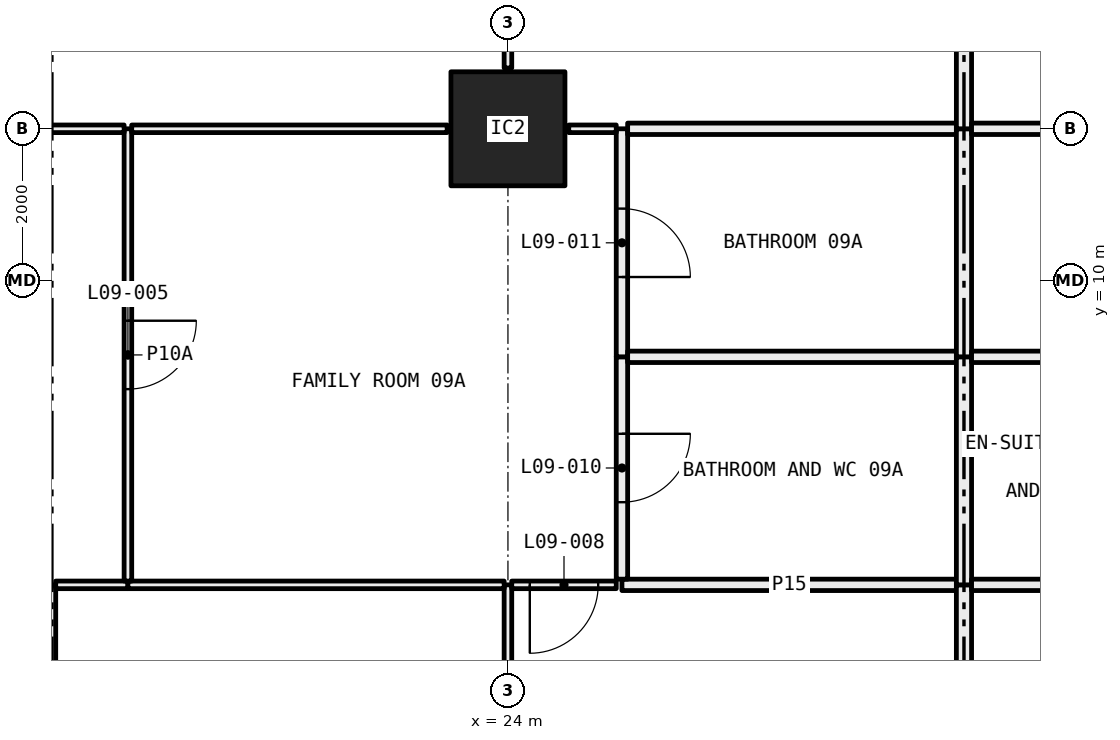
"""IFC4 building model, lengths in metres.
Left out: names, types, materials, properties, quantities, classifications, styles, units other than length and angle.
Written with IfcOpenShell. Run it as: python <this file> out.ifc"""

import sys

from ifc_helpers import new_model, si_unit, direction, frame, frame_2d, origin, origin_2d, place, context, subcontext, project, spatial, rectangle, hollow_rectangle, extrude, element, fill, save


model = new_model("IFC4")
c1 = context("Model", 3, precision=1e-05, world=origin(), true_north=direction((0.0, 1.0)))
c2 = subcontext(c1, "Body", "Model", "MODEL_VIEW")
j1 = project(units=[si_unit("LENGTHUNIT", "METRE"), si_unit("PLANEANGLEUNIT", "RADIAN")], contexts=[c1])
p1 = place(None, origin())
s1 = spatial("IfcSite", under=j1, at=p1, CompositionType="ELEMENT")
p2 = place(p1, origin())
s2 = spatial("IfcBuilding", under=s1, at=p2, CompositionType="ELEMENT")
p3 = place(p2, frame((0.0, 0.0, 43.8)))
s3 = spatial("IfcBuildingStorey", under=s2, at=p3, CompositionType="ELEMENT", Elevation=43.8)
p4 = place(p3, frame((24.0, 12.0, 0.0), z_axis=(0.0, 0.0, 1.0), x_axis=(1.0, 0.0, 0.0)))
e1 = element("IfcColumn", 1, at=p4, inside=s3, PredefinedType="COLUMN", context=c2, shape_type="SweptSolid", body=[
    extrude(hollow_rectangle(XDim=1.5, YDim=1.5, WallThickness=0.065, at=origin_2d()), origin(), (0.0, 0.0, 1.0), 3.05),
])
p5 = place(p3, frame((18.0, 0.72, 0.0), z_axis=(0.0, 0.0, 1.0), x_axis=(0.0, 1.0, 0.0)))
e2 = element("IfcWall", 2, at=p5, inside=s3, PredefinedType="PARTITIONING", context=c2, shape_type="SweptSolid", body=[
    extrude(rectangle(XDim=5.28, YDim=0.1, at=frame_2d((2.64, 0.0))), origin(), (0.0, 0.0, 1.0), 3.05),
])
p6 = place(p5, frame((2.19, 0.0, 0.0)))
e3 = element("IfcOpeningElement", 3, at=p6, cuts=e2, PredefinedType="OPENING", context=c2, shape_type="SweptSolid", body=[
    extrude(rectangle(XDim=0.9, YDim=2.1, at=frame_2d((0.45, 1.05))), frame((0.0, 0.06, 0.0), z_axis=(0.0, -1.0, 0.0), x_axis=(1.0, 0.0, 0.0)), (0.0, 0.0, 1.0), 0.12),
])
p7 = place(p3, frame((24.0, 0.72, 0.0), z_axis=(0.0, 0.0, 1.0), x_axis=(0.0, 1.0, 0.0)))
e4 = element("IfcWall", 4, at=p7, inside=s3, PredefinedType="PARTITIONING", context=c2, shape_type="SweptSolid", body=[
    extrude(rectangle(XDim=5.28, YDim=0.1, at=frame_2d((2.64, 0.0))), origin(), (0.0, 0.0, 1.0), 2.45),
])
p8 = place(p3, frame((19.0, 6.0, 0.0), z_axis=(0.0, 0.0, 1.0), x_axis=(-1.0, 0.0, 0.0)))
e5 = element("IfcWall", 5, at=p8, inside=s3, PredefinedType="PARTITIONING", context=c2, shape_type="SweptSolid", body=[
    extrude(rectangle(XDim=0.95, YDim=0.1, at=frame_2d((0.475, 0.0))), origin(), (0.0, 0.0, 1.0), 3.05),
])
p9 = place(p3, frame((23.95, 6.0, 0.0), z_axis=(0.0, 0.0, 1.0), x_axis=(-1.0, 0.0, 0.0)))
e6 = element("IfcWall", 6, at=p9, inside=s3, PredefinedType="PARTITIONING", context=c2, shape_type="SweptSolid", body=[
    extrude(rectangle(XDim=4.95, YDim=0.1, at=frame_2d((2.475, 0.0))), origin(), (0.0, 0.0, 1.0), 2.45),
])
p10 = place(p3, frame((25.425, 6.0, 0.0), z_axis=(0.0, 0.0, 1.0), x_axis=(-1.0, 0.0, 0.0)))
e7 = element("IfcWall", 7, at=p10, inside=s3, PredefinedType="PARTITIONING", context=c2, shape_type="SweptSolid", body=[
    extrude(rectangle(XDim=1.375, YDim=0.1, at=frame_2d((0.688, 0.0))), origin(), (0.0, 0.0, 1.0), 2.45),
])
p11 = place(p10, frame((0.238, 0.0, 0.0)))
e8 = element("IfcOpeningElement", 8, at=p11, cuts=e7, PredefinedType="OPENING", context=c2, shape_type="SweptSolid", body=[
    extrude(rectangle(XDim=0.9, YDim=2.1, at=frame_2d((0.45, 1.05))), frame((0.0, 0.06, 0.0), z_axis=(0.0, -1.0, 0.0), x_axis=(1.0, 0.0, 0.0)), (0.0, 0.0, 1.0), 0.12),
])
p12 = place(p3, frame((29.9, 6.0, 0.0), z_axis=(0.0, 0.0, 1.0), x_axis=(-1.0, 0.0, 0.0)))
e9 = element("IfcWall", 9, at=p12, inside=s3, PredefinedType="PARTITIONING", context=c2, shape_type="SweptSolid", body=[
    extrude(rectangle(XDim=4.4, YDim=0.15, at=frame_2d((2.2, 0.0))), origin(), (0.0, 0.0, 1.0), 3.05),
])
p13 = place(p3, frame((30.0, 0.72, 0.0), z_axis=(0.0, 0.0, 1.0), x_axis=(0.0, 1.0, 0.0)))
e10 = element("IfcWall", 10, at=p13, inside=s3, PredefinedType="PARTITIONING", context=c2, shape_type="SweptSolid", body=[
    extrude(rectangle(XDim=5.28, YDim=0.2, at=frame_2d((2.64, 0.0))), origin(), (0.0, 0.0, 1.0), 3.05),
])
p14 = place(p3, frame((19.0, 6.05, 0.0), z_axis=(0.0, 0.0, 1.0), x_axis=(0.0, 1.0, 0.0)))
e11 = element("IfcWall", 11, at=p14, inside=s3, PredefinedType="PARTITIONING", context=c2, shape_type="SweptSolid", body=[
    extrude(rectangle(XDim=5.95, YDim=0.1, at=frame_2d((2.975, 0.0))), origin(), (0.0, 0.0, 1.0), 2.45),
])
p15 = place(p14, frame((2.525, 0.0, 0.0)))
e12 = element("IfcOpeningElement", 12, at=p15, cuts=e11, PredefinedType="OPENING", context=c2, shape_type="SweptSolid", body=[
    extrude(rectangle(XDim=0.9, YDim=2.1, at=frame_2d((0.45, 1.05))), frame((0.0, 0.06, 0.0), z_axis=(0.0, -1.0, 0.0), x_axis=(1.0, 0.0, 0.0)), (0.0, 0.0, 1.0), 0.12),
])
p16 = place(p3, frame((18.95, 12.0, 0.0), z_axis=(0.0, 0.0, 1.0), x_axis=(-1.0, 0.0, 0.0)))
e13 = element("IfcWall", 13, at=p16, inside=s3, PredefinedType="PARTITIONING", context=c2, shape_type="SweptSolid", body=[
    extrude(rectangle(XDim=2.45, YDim=0.1, at=frame_2d((1.225, 0.0))), origin(), (0.0, 0.0, 1.0), 2.45),
])
p17 = place(p3, frame((25.5, 6.075, 0.0), z_axis=(0.0, 0.0, 1.0), x_axis=(0.0, 1.0, 0.0)))
e14 = element("IfcWall", 14, at=p17, inside=s3, PredefinedType="PARTITIONING", context=c2, shape_type="SweptSolid", body=[
    extrude(rectangle(XDim=2.925, YDim=0.15, at=frame_2d((1.462, 0.0))), origin(), (0.0, 0.0, 1.0), 3.05),
])
p18 = place(p17, frame((1.012, 0.0, 0.0)))
e15 = element("IfcOpeningElement", 15, at=p18, cuts=e14, PredefinedType="OPENING", context=c2, shape_type="SweptSolid", body=[
    extrude(rectangle(XDim=0.9, YDim=2.1, at=frame_2d((0.45, 1.05))), frame((0.0, 0.085, 0.0), z_axis=(0.0, -1.0, 0.0), x_axis=(1.0, 0.0, 0.0)), (0.0, 0.0, 1.0), 0.17),
])
p19 = place(p3, frame((25.5, 9.0, 0.0), z_axis=(0.0, 0.0, 1.0), x_axis=(0.0, 1.0, 0.0)))
e16 = element("IfcWall", 16, at=p19, inside=s3, PredefinedType="PARTITIONING", context=c2, shape_type="SweptSolid", body=[
    extrude(rectangle(XDim=3.0, YDim=0.15, at=frame_2d((1.5, 0.0))), origin(), (0.0, 0.0, 1.0), 2.45),
])
p20 = place(p19, frame((1.05, 0.0, 0.0)))
e17 = element("IfcOpeningElement", 17, at=p20, cuts=e16, PredefinedType="OPENING", context=c2, shape_type="SweptSolid", body=[
    extrude(rectangle(XDim=0.9, YDim=2.1, at=frame_2d((0.45, 1.05))), frame((0.0, 0.085, 0.0), z_axis=(0.0, -1.0, 0.0), x_axis=(1.0, 0.0, 0.0)), (0.0, 0.0, 1.0), 0.17),
])
p21 = place(p3, frame((23.2, 12.0, 0.0), z_axis=(0.0, 0.0, 1.0), x_axis=(-1.0, 0.0, 0.0)))
e18 = element("IfcWall", 18, at=p21, inside=s3, PredefinedType="PARTITIONING", context=c2, shape_type="SweptSolid", body=[
    extrude(rectangle(XDim=4.15, YDim=0.1, at=frame_2d((2.075, 0.0))), origin(), (0.0, 0.0, 1.0), 2.45),
])
p22 = place(p3, frame((25.425, 12.0, 0.0), z_axis=(0.0, 0.0, 1.0), x_axis=(-1.0, 0.0, 0.0)))
e19 = element("IfcWall", 19, at=p22, inside=s3, PredefinedType="PARTITIONING", context=c2, shape_type="SweptSolid", body=[
    extrude(rectangle(XDim=0.625, YDim=0.1, at=frame_2d((0.312, 0.0))), origin(), (0.0, 0.0, 1.0), 2.45),
])
p23 = place(p3, frame((29.9, 9.0, 0.0), z_axis=(0.0, 0.0, 1.0), x_axis=(-1.0, 0.0, 0.0)))
e20 = element("IfcWall", 20, at=p23, inside=s3, PredefinedType="PARTITIONING", context=c2, shape_type="SweptSolid", body=[
    extrude(rectangle(XDim=4.325, YDim=0.15, at=frame_2d((2.163, 0.0))), origin(), (0.0, 0.0, 1.0), 3.05),
])
p24 = place(p3, frame((30.0, 6.0, 0.0), z_axis=(0.0, 0.0, 1.0), x_axis=(0.0, 1.0, 0.0)))
e21 = element("IfcWall", 21, at=p24, inside=s3, PredefinedType="PARTITIONING", context=c2, shape_type="SweptSolid", body=[
    extrude(rectangle(XDim=3.0, YDim=0.2, at=frame_2d((1.5, 0.0))), origin(), (0.0, 0.0, 1.0), 3.05),
])
p25 = place(p3, frame((29.9, 12.0, 0.0), z_axis=(0.0, 0.0, 1.0), x_axis=(-1.0, 0.0, 0.0)))
e22 = element("IfcWall", 22, at=p25, inside=s3, PredefinedType="PARTITIONING", context=c2, shape_type="SweptSolid", body=[
    extrude(rectangle(XDim=4.325, YDim=0.15, at=frame_2d((2.163, 0.0))), origin(), (0.0, 0.0, 1.0), 2.45),
])
p26 = place(p3, frame((30.0, 9.0, 0.0), z_axis=(0.0, 0.0, 1.0), x_axis=(0.0, 1.0, 0.0)))
e23 = element("IfcWall", 23, at=p26, inside=s3, PredefinedType="PARTITIONING", context=c2, shape_type="SweptSolid", body=[
    extrude(rectangle(XDim=3.0, YDim=0.2, at=frame_2d((1.5, 0.0))), origin(), (0.0, 0.0, 1.0), 2.45),
])
p27 = place(p3, frame((24.0, 12.8, 0.0), z_axis=(0.0, 0.0, 1.0), x_axis=(0.0, 1.0, 0.0)))
e24 = element("IfcWall", 24, at=p27, inside=s3, PredefinedType="PARTITIONING", context=c2, shape_type="SweptSolid", body=[
    extrude(rectangle(XDim=5.1, YDim=0.1, at=frame_2d((2.55, 0.0))), origin(), (0.0, 0.0, 1.0), 3.05),
])
p28 = place(p27, frame((2.1, 0.0, 0.0)))
e25 = element("IfcOpeningElement", 25, at=p28, cuts=e24, PredefinedType="OPENING", context=c2, shape_type="SweptSolid", body=[
    extrude(rectangle(XDim=0.9, YDim=2.1, at=frame_2d((0.45, 1.05))), frame((0.0, 0.06, 0.0), z_axis=(0.0, -1.0, 0.0), x_axis=(1.0, 0.0, 0.0)), (0.0, 0.0, 1.0), 0.12),
])
p29 = place(p3, frame((30.0, 12.0, 0.0), z_axis=(0.0, 0.0, 1.0), x_axis=(0.0, 1.0, 0.0)))
e26 = element("IfcWall", 26, at=p29, inside=s3, PredefinedType="PARTITIONING", context=c2, shape_type="SweptSolid", body=[
    extrude(rectangle(XDim=6.0, YDim=0.2, at=frame_2d((3.0, 0.0))), origin(), (0.0, 0.0, 1.0), 2.45),
])
p30 = place(p3, frame((34.5, 6.0, 0.0), z_axis=(0.0, 0.0, 1.0), x_axis=(-1.0, 0.0, 0.0)))
e27 = element("IfcWall", 27, at=p30, inside=s3, PredefinedType="PARTITIONING", context=c2, shape_type="SweptSolid", body=[
    extrude(rectangle(XDim=4.4, YDim=0.15, at=frame_2d((2.2, 0.0))), origin(), (0.0, 0.0, 1.0), 3.05),
])
p31 = place(p30, frame((1.75, 0.0, 0.0)))
e28 = element("IfcOpeningElement", 28, at=p31, cuts=e27, PredefinedType="OPENING", context=c2, shape_type="SweptSolid", body=[
    extrude(rectangle(XDim=0.9, YDim=2.1, at=frame_2d((0.45, 1.05))), frame((0.0, 0.085, 0.0), z_axis=(0.0, -1.0, 0.0), x_axis=(1.0, 0.0, 0.0)), (0.0, 0.0, 1.0), 0.17),
])
p32 = place(p3, frame((34.5, 9.0, 0.0), z_axis=(0.0, 0.0, 1.0), x_axis=(-1.0, 0.0, 0.0)))
e29 = element("IfcWall", 29, at=p32, inside=s3, PredefinedType="PARTITIONING", context=c2, shape_type="SweptSolid", body=[
    extrude(rectangle(XDim=4.4, YDim=0.15, at=frame_2d((2.2, 0.0))), origin(), (0.0, 0.0, 1.0), 3.05),
])
p33 = place(p3, frame((34.425, 12.0, 0.0), z_axis=(0.0, 0.0, 1.0), x_axis=(-1.0, 0.0, 0.0)))
e30 = element("IfcWall", 30, at=p33, inside=s3, PredefinedType="PARTITIONING", context=c2, shape_type="SweptSolid", body=[
    extrude(rectangle(XDim=4.325, YDim=0.15, at=frame_2d((2.163, 0.0))), origin(), (0.0, 0.0, 1.0), 2.45),
])
p34 = place(p15, frame((0.9, 0.0, 0.0), x_axis=(-1.0, 0.0, 0.0)))
e31 = element("IfcDoor", 31, at=p34, inside=s3, OperationType="SINGLE_SWING_RIGHT", PredefinedType="DOOR", context=c2, shape_type="SweptSolid", body=[
    extrude(rectangle(XDim=0.9, YDim=2.1, at=frame_2d((0.45, 1.05))), frame((0.0, 0.025, 0.0), z_axis=(0.0, -1.0, 0.0), x_axis=(1.0, 0.0, 0.0)), (0.0, 0.0, 1.0), 0.05),
])
fill(e12, e31)
p35 = place(p11, origin())
e32 = element("IfcDoor", 32, at=p35, inside=s3, OperationType="SINGLE_SWING_LEFT", PredefinedType="DOOR", context=c2, shape_type="SweptSolid", body=[
    extrude(rectangle(XDim=0.9, YDim=2.1, at=frame_2d((0.45, 1.05))), frame((0.0, 0.025, 0.0), z_axis=(0.0, -1.0, 0.0), x_axis=(1.0, 0.0, 0.0)), (0.0, 0.0, 1.0), 0.05),
])
fill(e8, e32)
p36 = place(p18, frame((0.9, 0.0, 0.0), x_axis=(-1.0, 0.0, 0.0)))
e33 = element("IfcDoor", 33, at=p36, inside=s3, OperationType="SINGLE_SWING_RIGHT", PredefinedType="DOOR", context=c2, shape_type="SweptSolid", body=[
    extrude(rectangle(XDim=0.9, YDim=2.1, at=frame_2d((0.45, 1.05))), frame((0.0, 0.025, 0.0), z_axis=(0.0, -1.0, 0.0), x_axis=(1.0, 0.0, 0.0)), (0.0, 0.0, 1.0), 0.05),
])
fill(e15, e33)
p37 = place(p20, frame((0.9, 0.0, 0.0), x_axis=(-1.0, 0.0, 0.0)))
e34 = element("IfcDoor", 34, at=p37, inside=s3, OperationType="SINGLE_SWING_LEFT", PredefinedType="DOOR", context=c2, shape_type="SweptSolid", body=[
    extrude(rectangle(XDim=0.9, YDim=2.1, at=frame_2d((0.45, 1.05))), frame((0.0, 0.025, 0.0), z_axis=(0.0, -1.0, 0.0), x_axis=(1.0, 0.0, 0.0)), (0.0, 0.0, 1.0), 0.05),
])
fill(e17, e34)
save(model, sys.argv[1])
